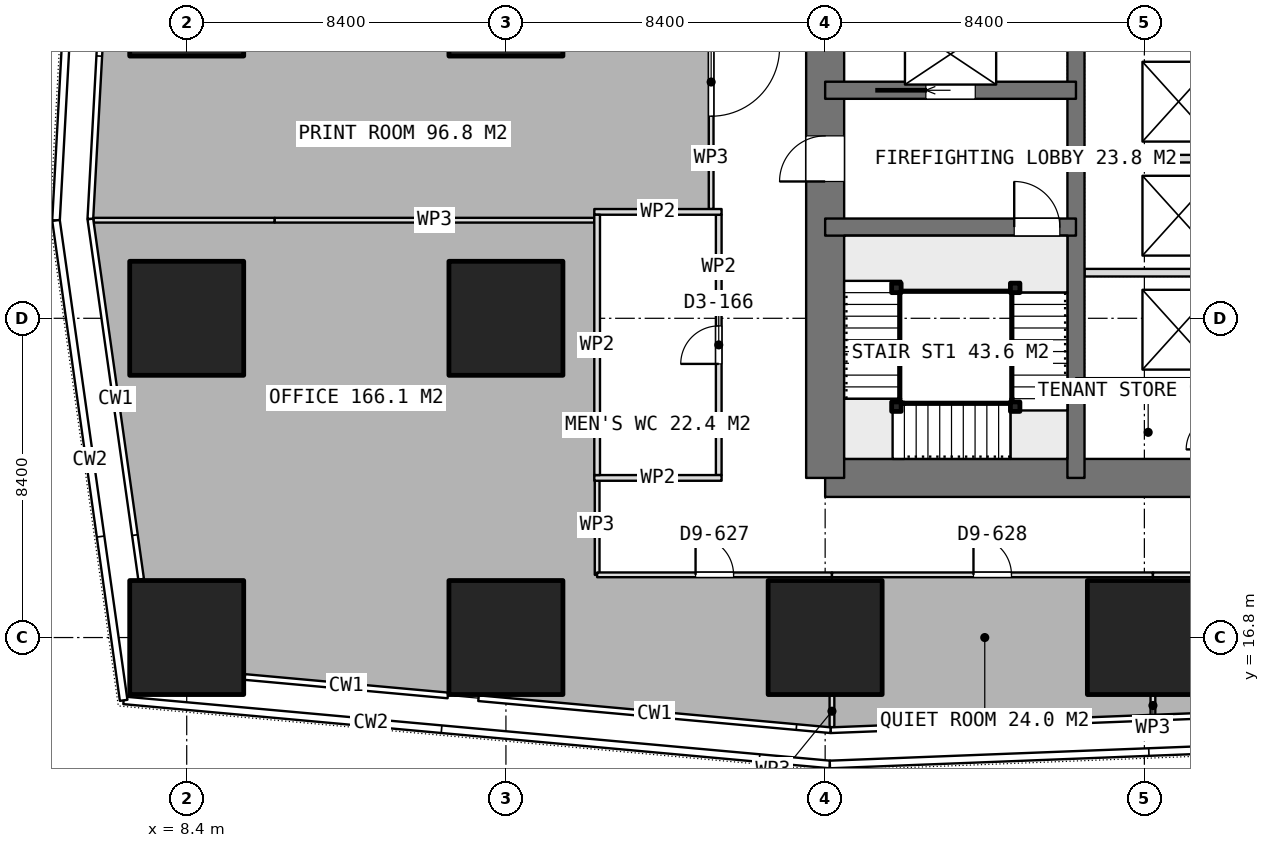
"""IFC4 building model, lengths in metres.
Left out: names, types, materials, properties, quantities, classifications, styles, units other than length and angle.
Written with IfcOpenShell. Run it as: python <this file> out.ifc"""

import sys

from ifc_helpers import new_model, si_unit, direction, frame, frame_2d, origin, origin_2d, place, context, subcontext, project, spatial, rectangle, extrude, element, fill, save


model = new_model("IFC4")
c1 = context("Model", 3, precision=1e-05, world=origin(), true_north=direction((0.0, 1.0)))
c2 = subcontext(c1, "Body", "Model", "MODEL_VIEW")
j1 = project(units=[si_unit("LENGTHUNIT", "METRE"), si_unit("PLANEANGLEUNIT", "RADIAN")], contexts=[c1])
p1 = place(None, origin())
s1 = spatial("IfcSite", under=j1, at=p1, CompositionType="ELEMENT")
p2 = place(p1, origin())
s2 = spatial("IfcBuilding", under=s1, at=p2, CompositionType="ELEMENT")
p3 = place(p2, frame((0.0, 0.0, 155.3)))
s3 = spatial("IfcBuildingStorey", under=s2, at=p3, CompositionType="ELEMENT", Elevation=155.3)
p4 = place(p3, frame((25.2, 21.0, 0.0), z_axis=(0.0, 0.0, 1.0), x_axis=(1.0, 0.0, 0.0)))
e1 = element("IfcWall", 1, at=p4, inside=s3, PredefinedType="SHEAR", context=c2, shape_type="SweptSolid", body=[
    extrude(rectangle(XDim=10.4, YDim=1.0, at=frame_2d((5.2, 0.0))), origin(), (0.0, 0.0, 1.0), 3.75),
])
p5 = place(p3, frame((25.2, 21.0, 0.0), z_axis=(0.0, 0.0, 1.0), x_axis=(0.0, 1.0, 0.0)))
e2 = element("IfcWall", 2, at=p5, inside=s3, PredefinedType="SHEAR", context=c2, shape_type="SweptSolid", body=[
    extrude(rectangle(XDim=25.2, YDim=1.0, at=frame_2d((12.6, 0.0))), origin(), (0.0, 0.0, 1.0), 3.75),
])
p6 = place(p5, frame((7.8, 0.0, 0.0)))
e3 = element("IfcOpeningElement", 3, at=p6, cuts=e2, PredefinedType="OPENING", context=c2, shape_type="SweptSolid", body=[
    extrude(rectangle(XDim=1.2, YDim=2.1, at=frame_2d((0.6, 1.05))), frame((0.0, 0.51, 0.0), z_axis=(0.0, -1.0, 0.0), x_axis=(1.0, 0.0, 0.0)), (0.0, 0.0, 1.0), 1.02),
])
p7 = place(p5, frame((14.25, 0.0, 0.0)))
e4 = element("IfcOpeningElement", 4, at=p7, cuts=e2, PredefinedType="OPENING", context=c2, shape_type="SweptSolid", body=[
    extrude(rectangle(XDim=0.9, YDim=2.1, at=frame_2d((0.45, 1.05))), frame((0.0, 0.51, 0.0), z_axis=(0.0, -1.0, 0.0), x_axis=(1.0, 0.0, 0.0)), (0.0, 0.0, 1.0), 1.02),
])
p8 = place(p5, frame((16.85, 0.0, 0.0)))
e5 = element("IfcOpeningElement", 5, at=p8, cuts=e2, PredefinedType="OPENING", context=c2, shape_type="SweptSolid", body=[
    extrude(rectangle(XDim=0.9, YDim=2.1, at=frame_2d((0.45, 1.05))), frame((0.0, 0.51, 0.0), z_axis=(0.0, -1.0, 0.0), x_axis=(1.0, 0.0, 0.0)), (0.0, 0.0, 1.0), 1.02),
])
p9 = place(p5, frame((19.025, 0.0, 0.0)))
e6 = element("IfcOpeningElement", 6, at=p9, cuts=e2, PredefinedType="OPENING", context=c2, shape_type="SweptSolid", body=[
    extrude(rectangle(XDim=1.2, YDim=2.1, at=frame_2d((0.6, 1.05))), frame((0.0, 0.51, 0.0), z_axis=(0.0, -1.0, 0.0), x_axis=(1.0, 0.0, 0.0)), (0.0, 0.0, 1.0), 1.02),
])
p10 = place(p3, frame((31.8, 21.0, 0.0), z_axis=(0.0, 0.0, 1.0), x_axis=(0.0, 1.0, 0.0)))
e7 = element("IfcWall", 7, at=p10, inside=s3, PredefinedType="SHEAR", context=c2, shape_type="SweptSolid", body=[
    extrude(rectangle(XDim=25.2, YDim=0.45, at=frame_2d((12.6, 0.0))), origin(), (0.0, 0.0, 1.0), 3.75),
])
p11 = place(p3, frame((31.8, 23.4, 0.0), z_axis=(0.0, 0.0, 1.0), x_axis=(1.0, 0.0, 0.0)))
e8 = element("IfcWall", 8, at=p11, inside=s3, PredefinedType="SHEAR", context=c2, shape_type="SweptSolid", body=[
    extrude(rectangle(XDim=3.8, YDim=0.45, at=frame_2d((1.9, 0.0))), origin(), (0.0, 0.0, 1.0), 3.75),
])
p12 = place(p3, frame((25.2, 27.6, 0.0), z_axis=(0.0, 0.0, 1.0), x_axis=(1.0, 0.0, 0.0)))
e9 = element("IfcWall", 9, at=p12, inside=s3, PredefinedType="SHEAR", context=c2, shape_type="SweptSolid", body=[
    extrude(rectangle(XDim=6.6, YDim=0.45, at=frame_2d((3.3, 0.0))), origin(), (0.0, 0.0, 1.0), 3.75),
])
p13 = place(p12, frame((4.975, 0.0, 0.0)))
e10 = element("IfcOpeningElement", 10, at=p13, cuts=e9, PredefinedType="OPENING", context=c2, shape_type="SweptSolid", body=[
    extrude(rectangle(XDim=1.2, YDim=2.1, at=frame_2d((0.6, 1.05))), frame((0.0, 0.235, 0.0), z_axis=(0.0, -1.0, 0.0), x_axis=(1.0, 0.0, 0.0)), (0.0, 0.0, 1.0), 0.47),
])
p14 = place(p3, frame((25.2, 31.2, 0.0), z_axis=(0.0, 0.0, 1.0), x_axis=(1.0, 0.0, 0.0)))
e11 = element("IfcWall", 11, at=p14, inside=s3, PredefinedType="SHEAR", context=c2, shape_type="SweptSolid", body=[
    extrude(rectangle(XDim=6.6, YDim=0.45, at=frame_2d((3.3, 0.0))), origin(), (0.0, 0.0, 1.0), 3.75),
])
p15 = place(p14, frame((2.65, 0.0, 0.0)))
e12 = element("IfcOpeningElement", 12, at=p15, cuts=e11, PredefinedType="OPENING", context=c2, shape_type="SweptSolid", body=[
    extrude(rectangle(XDim=1.3, YDim=2.1, at=frame_2d((0.65, 1.05))), frame((0.0, 0.235, 0.0), z_axis=(0.0, -1.0, 0.0), x_axis=(1.0, 0.0, 0.0)), (0.0, 0.0, 1.0), 0.47),
])
for number, where, z_axis, x_axis in (
    (13, (8.4, 16.8, 0.0), (0.0, 0.0, 1.0), (1.0, 0.0, 0.0)),
    (14, (8.4, 25.2, 0.0), (0.0, 0.0, 1.0), (1.0, 0.0, 0.0)),
    (15, (8.4, 33.6, 0.0), (0.0, 0.0, 1.0), (1.0, 0.0, 0.0)),
    (16, (16.8, 16.8, 0.0), (0.0, 0.0, 1.0), (1.0, 0.0, 0.0)),
    (17, (16.8, 25.2, 0.0), (0.0, 0.0, 1.0), (1.0, 0.0, 0.0)),
    (18, (16.8, 33.6, 0.0), (0.0, 0.0, 1.0), (1.0, 0.0, 0.0)),
    (19, (25.2, 16.8, 0.0), (0.0, 0.0, 1.0), (1.0, 0.0, 0.0)),
    (20, (33.6, 16.8, 0.0), (0.0, 0.0, 1.0), (1.0, 0.0, 0.0)),
):
    element("IfcColumn", number, at=place(p3, frame(where, z_axis=z_axis, x_axis=x_axis)), inside=s3, PredefinedType="COLUMN", context=c2, shape_type="SweptSolid", body=[
        extrude(rectangle(XDim=3.0, YDim=3.0, at=origin_2d()), origin(), (0.0, 0.0, 1.0), 3.75),
    ])
for number, where, z_axis, x_axis in (
    (21, (32.025, 26.4, 0.0), (0.0, 0.0, 1.0), (1.0, 0.0, 0.0)),
    (22, (32.025, 29.4, 0.0), (0.0, 0.0, 1.0), (1.0, 0.0, 0.0)),
):
    element("IfcWall", number, at=place(p3, frame(where, z_axis=z_axis, x_axis=x_axis)), inside=s3, PredefinedType="PARTITIONING", context=c2, shape_type="SweptSolid", body=[
        extrude(rectangle(XDim=3.075, YDim=0.2, at=frame_2d((1.538, 0.0))), origin(), (0.0, 0.0, 1.0), 3.5),
    ])
for number, where, z_axis, x_axis in (
    (23, (19.125, 21.0, 0.0), (0.0, 0.0, 1.0), (1.0, 0.0, 0.0)),
    (24, (19.125, 28.0, 0.0), (0.0, 0.0, 1.0), (1.0, 0.0, 0.0)),
):
    element("IfcWall", number, at=place(p3, frame(where, z_axis=z_axis, x_axis=x_axis)), inside=s3, PredefinedType="PARTITIONING", context=c2, shape_type="SweptSolid", body=[
        extrude(rectangle(XDim=3.35, YDim=0.15, at=frame_2d((1.675, 0.0))), origin(), (0.0, 0.0, 1.0), 3.5),
    ])
p16 = place(p3, frame((19.2, 21.075, 0.0), z_axis=(0.0, 0.0, 1.0), x_axis=(0.0, 1.0, 0.0)))
e25 = element("IfcWall", 25, at=p16, inside=s3, PredefinedType="PARTITIONING", context=c2, shape_type="SweptSolid", body=[
    extrude(rectangle(XDim=6.85, YDim=0.15, at=frame_2d((3.425, 0.0))), origin(), (0.0, 0.0, 1.0), 3.5),
])
p17 = place(p3, frame((22.4, 21.075, 0.0), z_axis=(0.0, 0.0, 1.0), x_axis=(0.0, 1.0, 0.0)))
e26 = element("IfcWall", 26, at=p17, inside=s3, PredefinedType="PARTITIONING", context=c2, shape_type="SweptSolid", body=[
    extrude(rectangle(XDim=6.85, YDim=0.15, at=frame_2d((3.425, 0.0))), origin(), (0.0, 0.0, 1.0), 3.5),
])
p18 = place(p17, frame((2.925, 0.0, 0.0)))
e27 = element("IfcOpeningElement", 27, at=p18, cuts=e26, PredefinedType="OPENING", context=c2, shape_type="SweptSolid", body=[
    extrude(rectangle(XDim=1.0, YDim=2.1, at=frame_2d((0.5, 1.05))), frame((0.0, 0.085, 0.0), z_axis=(0.0, -1.0, 0.0), x_axis=(1.0, 0.0, 0.0)), (0.0, 0.0, 1.0), 0.17),
])
p19 = place(p3, frame((5.949, 27.781, 0.0), z_axis=(0.0, 0.0, 1.0), x_axis=(1.0, 0.0, 0.0)))
e28 = element("IfcWall", 28, at=p19, inside=s3, PredefinedType="PARTITIONING", context=c2, shape_type="SweptSolid", body=[
    extrude(rectangle(XDim=4.767, YDim=0.125, at=frame_2d((2.384, 0.0))), origin(), (0.0, 0.0, 1.0), 3.5),
])
p20 = place(p3, frame((25.379, 15.28, 0.0), z_axis=(0.0, 0.0, 1.0), x_axis=(0.0, -1.0, 0.0)))
e29 = element("IfcWall", 29, at=p20, inside=s3, PredefinedType="PARTITIONING", context=c2, shape_type="SweptSolid", body=[
    extrude(rectangle(XDim=0.837, YDim=0.125, at=frame_2d((0.418, 0.0))), origin(), (0.0, 0.0, 1.0), 3.5),
])
p21 = place(p3, frame((10.716, 27.781, 0.0), z_axis=(0.0, 0.0, 1.0), x_axis=(1.0, 0.0, 0.0)))
e30 = element("IfcWall", 30, at=p21, inside=s3, PredefinedType="PARTITIONING", context=c2, shape_type="SweptSolid", body=[
    extrude(rectangle(XDim=8.409, YDim=0.125, at=frame_2d((4.205, 0.0))), origin(), (0.0, 0.0, 1.0), 3.5),
])
p22 = place(p3, frame((19.2, 21.075, 0.0), z_axis=(0.0, 0.0, 1.0), x_axis=(0.0, -1.0, 0.0)))
e31 = element("IfcWall", 31, at=p22, inside=s3, PredefinedType="PARTITIONING", context=c2, shape_type="SweptSolid", body=[
    extrude(rectangle(XDim=2.625, YDim=0.125, at=frame_2d((1.312, 0.0))), origin(), (0.0, 0.0, 1.0), 3.5),
])
p23 = place(p3, frame((19.2, 18.45, 0.0), z_axis=(0.0, 0.0, 1.0), x_axis=(1.0, 0.0, 0.0)))
e32 = element("IfcWall", 32, at=p23, inside=s3, PredefinedType="PARTITIONING", context=c2, shape_type="SweptSolid", body=[
    extrude(rectangle(XDim=6.179, YDim=0.125, at=frame_2d((3.089, 0.0))), origin(), (0.0, 0.0, 1.0), 3.5),
])
p24 = place(p23, frame((2.59, 0.0, 0.0)))
e33 = element("IfcOpeningElement", 33, at=p24, cuts=e32, PredefinedType="OPENING", context=c2, shape_type="SweptSolid", body=[
    extrude(rectangle(XDim=1.0, YDim=2.1, at=frame_2d((0.5, 1.05))), frame((0.0, 0.073, 0.0), z_axis=(0.0, -1.0, 0.0), x_axis=(1.0, 0.0, 0.0)), (0.0, 0.0, 1.0), 0.145),
])
p25 = place(p3, frame((25.38, 18.45, 0.0), z_axis=(0.0, 0.0, 1.0), x_axis=(1.0, 0.0, 0.0)))
e34 = element("IfcWall", 34, at=p25, inside=s3, PredefinedType="PARTITIONING", context=c2, shape_type="SweptSolid", body=[
    extrude(rectangle(XDim=8.445, YDim=0.125, at=frame_2d((4.223, 0.0))), origin(), (0.0, 0.0, 1.0), 3.5),
])
p26 = place(p25, frame((3.723, 0.0, 0.0)))
e35 = element("IfcOpeningElement", 35, at=p26, cuts=e34, PredefinedType="OPENING", context=c2, shape_type="SweptSolid", body=[
    extrude(rectangle(XDim=1.0, YDim=2.1, at=frame_2d((0.5, 1.05))), frame((0.0, 0.073, 0.0), z_axis=(0.0, -1.0, 0.0), x_axis=(1.0, 0.0, 0.0)), (0.0, 0.0, 1.0), 0.145),
])
p27 = place(p3, frame((33.825, 15.28, 0.0), z_axis=(0.0, 0.0, 1.0), x_axis=(0.0, -1.0, 0.0)))
e36 = element("IfcWall", 36, at=p27, inside=s3, PredefinedType="PARTITIONING", context=c2, shape_type="SweptSolid", body=[
    extrude(rectangle(XDim=0.538, YDim=0.125, at=frame_2d((0.269, 0.0))), origin(), (0.0, 0.0, 1.0), 3.5),
])
p28 = place(p3, frame((33.826, 18.45, 0.0), z_axis=(0.0, 0.0, 1.0), x_axis=(1.0, 0.0, 0.0)))
e37 = element("IfcWall", 37, at=p28, inside=s3, PredefinedType="PARTITIONING", context=c2, shape_type="SweptSolid", body=[
    extrude(rectangle(XDim=15.022, YDim=0.125, at=frame_2d((7.511, 0.0))), origin(), (0.0, 0.0, 1.0), 3.5),
])
p29 = place(p28, frame((4.811, 0.0, 0.0)))
e38 = element("IfcOpeningElement", 38, at=p29, cuts=e37, PredefinedType="OPENING", context=c2, shape_type="SweptSolid", body=[
    extrude(rectangle(XDim=1.8, YDim=2.1, at=frame_2d((0.9, 1.05))), frame((0.0, 0.073, 0.0), z_axis=(0.0, -1.0, 0.0), x_axis=(1.0, 0.0, 0.0)), (0.0, 0.0, 1.0), 0.145),
])
p30 = place(p3, frame((22.2, 34.834, 0.0), z_axis=(0.0, 0.0, 1.0), x_axis=(0.0, -1.0, 0.0)))
e39 = element("IfcWall", 39, at=p30, inside=s3, PredefinedType="PARTITIONING", context=c2, shape_type="SweptSolid", body=[
    extrude(rectangle(XDim=6.759, YDim=0.125, at=frame_2d((3.379, 0.0))), origin(), (0.0, 0.0, 1.0), 3.5),
])
p31 = place(p30, frame((2.517, 0.0, 0.0)))
e40 = element("IfcOpeningElement", 40, at=p31, cuts=e39, PredefinedType="OPENING", context=c2, shape_type="SweptSolid", body=[
    extrude(rectangle(XDim=1.8, YDim=2.1, at=frame_2d((0.9, 1.05))), frame((0.0, 0.073, 0.0), z_axis=(0.0, -1.0, 0.0), x_axis=(1.0, 0.0, 0.0)), (0.0, 0.0, 1.0), 0.145),
])
for number, where, z_axis, x_axis in (
    (41, (30.2, 26.0, 0.0), (0.0, 0.0, 1.0), (1.0, 0.0, 0.0)),
    (42, (30.2, 22.875, 0.0), (0.0, 0.0, 1.0), (1.0, 0.0, 0.0)),
    (43, (27.075, 22.875, 0.0), (0.0, 0.0, 1.0), (1.0, 0.0, 0.0)),
    (44, (27.075, 26.0, 0.0), (0.0, 0.0, 1.0), (1.0, 0.0, 0.0)),
):
    element("IfcColumn", number, at=place(p3, frame(where, z_axis=z_axis, x_axis=x_axis)), inside=s3, PredefinedType="COLUMN", context=c2, shape_type="SweptSolid", body=[
        extrude(rectangle(XDim=0.25, YDim=0.25, at=origin_2d()), origin(), (0.0, 0.0, 1.0), 3.75),
    ])
p32 = place(p6, origin())
e45 = element("IfcDoor", 45, at=p32, inside=s3, OperationType="SINGLE_SWING_LEFT", PredefinedType="DOOR", context=c2, shape_type="SweptSolid", body=[
    extrude(rectangle(XDim=1.2, YDim=2.1, at=frame_2d((0.6, 1.05))), frame((0.0, 0.025, 0.0), z_axis=(0.0, -1.0, 0.0), x_axis=(1.0, 0.0, 0.0)), (0.0, 0.0, 1.0), 0.05),
])
fill(e3, e45)
p33 = place(p15, origin())
e46 = element("IfcDoor", 46, at=p33, inside=s3, OperationType="SLIDING_TO_LEFT", PredefinedType="USERDEFINED", context=c2, shape_type="SweptSolid", body=[
    extrude(rectangle(XDim=1.3, YDim=2.1, at=frame_2d((0.65, 1.05))), frame((0.0, 0.025, 0.0), z_axis=(0.0, -1.0, 0.0), x_axis=(1.0, 0.0, 0.0)), (0.0, 0.0, 1.0), 0.05),
])
fill(e12, e46)
p34 = place(p18, origin())
e47 = element("IfcDoor", 47, at=p34, inside=s3, OperationType="SINGLE_SWING_LEFT", PredefinedType="DOOR", context=c2, shape_type="SweptSolid", body=[
    extrude(rectangle(XDim=1.0, YDim=2.1, at=frame_2d((0.5, 1.05))), frame((0.0, 0.025, 0.0), z_axis=(0.0, -1.0, 0.0), x_axis=(1.0, 0.0, 0.0)), (0.0, 0.0, 1.0), 0.05),
])
fill(e27, e47)
p35 = place(p24, origin())
e48 = element("IfcDoor", 48, at=p35, inside=s3, OperationType="SINGLE_SWING_LEFT", PredefinedType="DOOR", context=c2, shape_type="SweptSolid", body=[
    extrude(rectangle(XDim=1.0, YDim=2.1, at=frame_2d((0.5, 1.05))), frame((0.0, 0.025, 0.0), z_axis=(0.0, -1.0, 0.0), x_axis=(1.0, 0.0, 0.0)), (0.0, 0.0, 1.0), 0.05),
])
fill(e33, e48)
p36 = place(p26, origin())
e49 = element("IfcDoor", 49, at=p36, inside=s3, OperationType="SINGLE_SWING_LEFT", PredefinedType="DOOR", context=c2, shape_type="SweptSolid", body=[
    extrude(rectangle(XDim=1.0, YDim=2.1, at=frame_2d((0.5, 1.05))), frame((0.0, 0.025, 0.0), z_axis=(0.0, -1.0, 0.0), x_axis=(1.0, 0.0, 0.0)), (0.0, 0.0, 1.0), 0.05),
])
fill(e35, e49)
p37 = place(p31, origin())
e50 = element("IfcDoor", 50, at=p37, inside=s3, OperationType="DOUBLE_DOOR_SINGLE_SWING", PredefinedType="DOOR", context=c2, shape_type="SweptSolid", body=[
    extrude(rectangle(XDim=1.8, YDim=2.1, at=frame_2d((0.9, 1.05))), frame((0.0, 0.025, 0.0), z_axis=(0.0, -1.0, 0.0), x_axis=(1.0, 0.0, 0.0)), (0.0, 0.0, 1.0), 0.05),
])
fill(e40, e50)
p38 = place(p13, origin())
e51 = element("IfcDoor", 51, at=p38, inside=s3, OperationType="SINGLE_SWING_RIGHT", PredefinedType="DOOR", context=c2, shape_type="SweptSolid", body=[
    extrude(rectangle(XDim=1.2, YDim=2.1, at=frame_2d((0.6, 1.05))), frame((0.0, 0.025, 0.0), z_axis=(0.0, -1.0, 0.0), x_axis=(1.0, 0.0, 0.0)), (0.0, 0.0, 1.0), 0.05),
])
fill(e10, e51)
save(model, sys.argv[1])
